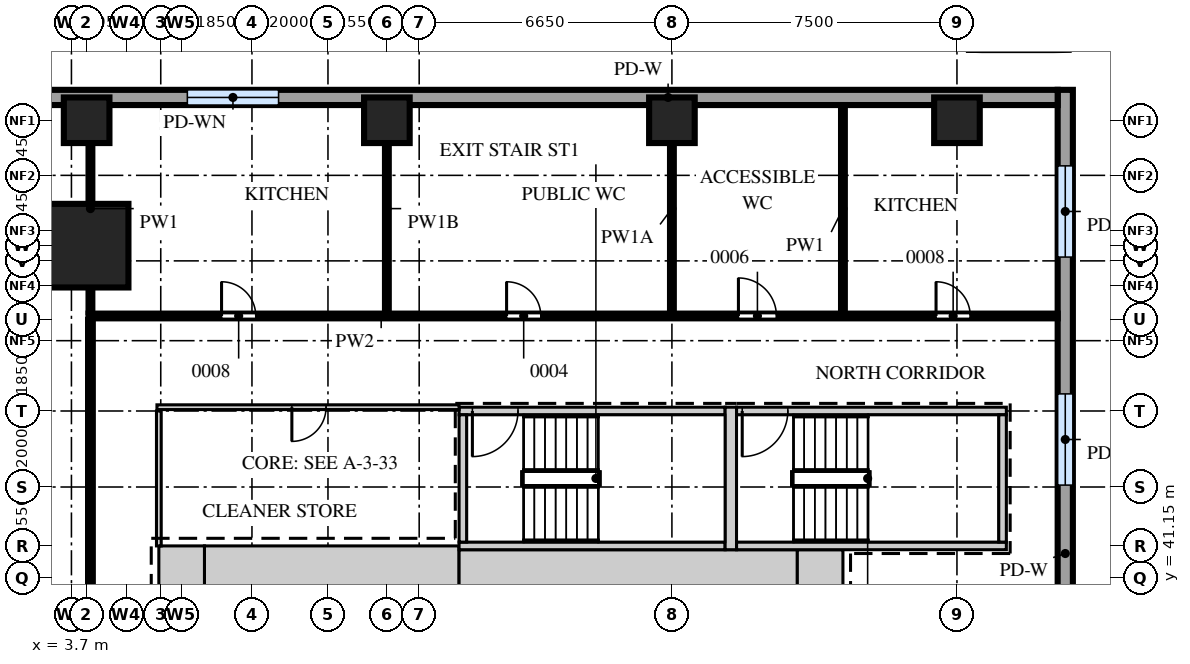
"""IFC4 building model, lengths in metres.
Left out: names, types, materials, properties, quantities, classifications, styles, units other than length and angle.
Written with IfcOpenShell. Run it as: python <this file> out.ifc"""

import sys

from ifc_helpers import new_model, si_unit, direction, frame, frame_2d, origin, origin_2d, place, context, subcontext, project, spatial, rectangle, extrude, source, transform, mapped, element, fill, save


model = new_model("IFC4")
c1 = context("Model", 3, precision=1e-05, world=origin(), true_north=direction((0.0, 1.0)))
c2 = subcontext(c1, "Body", "Model", "MODEL_VIEW")
j1 = project(units=[si_unit("LENGTHUNIT", "METRE"), si_unit("PLANEANGLEUNIT", "RADIAN")], contexts=[c1])
p1 = place(None, origin())
s1 = spatial("IfcSite", under=j1, at=p1, CompositionType="ELEMENT")
p2 = place(p1, origin())
s2 = spatial("IfcBuilding", under=s1, at=p2, CompositionType="ELEMENT")
p3 = place(p2, frame((0.0, 0.0, 13.0)))
s3 = spatial("IfcBuildingStorey", under=s2, at=p3, CompositionType="ELEMENT", Elevation=13.0)
m1 = source(origin(), c2, "Body", "SweptSolid", [
    extrude(rectangle(XDim=6.7, YDim=1.2, at=frame_2d((3.35, 0.0))), origin(), (0.0, 0.0, 1.0), 5.2),
])
p4 = place(p3, frame((7.2, 41.4, 0.0), z_axis=(0.0, 0.0, 1.0), x_axis=(1.0, 0.0, 0.0)))
e1 = element("IfcWall", 1, at=p4, inside=s3, PredefinedType="SHEAR", context=c2, shape_type="MappedRepresentation", body=[
    mapped(m1, transform((0.0, 0.0, 0.0))),
])
m2 = source(origin(), c2, "Body", "SweptSolid", [
    extrude(rectangle(XDim=8.9, YDim=1.1, at=frame_2d((4.45, 0.0))), origin(), (0.0, 0.0, 1.0), 5.2),
])
p5 = place(p3, frame((13.9, 41.35, 0.0), z_axis=(0.0, 0.0, 1.0), x_axis=(1.0, 0.0, 0.0)))
e2 = element("IfcWall", 2, at=p5, inside=s3, PredefinedType="SHEAR", context=c2, shape_type="MappedRepresentation", body=[
    mapped(m2, transform((0.0, 0.0, 0.0))),
])
m3 = source(origin(), c2, "Body", "SweptSolid", [
    extrude(rectangle(XDim=1.2, YDim=1.1, at=frame_2d((0.6, 0.0))), origin(), (0.0, 0.0, 1.0), 5.2),
])
p6 = place(p3, frame((22.8, 41.35, 0.0), z_axis=(0.0, 0.0, 1.0), x_axis=(1.0, 0.0, 0.0)))
e3 = element("IfcWall", 3, at=p6, inside=s3, PredefinedType="SHEAR", context=c2, shape_type="MappedRepresentation", body=[
    mapped(m3, transform((0.0, 0.0, 0.0))),
])
m4 = source(origin(), c2, "Body", "SweptSolid", [
    extrude(rectangle(XDim=1.2, YDim=1.2, at=frame_2d((0.6, 0.0))), origin(), (0.0, 0.0, 1.0), 5.2),
])
p7 = place(p3, frame((6.0, 41.4, 0.0), z_axis=(0.0, 0.0, 1.0), x_axis=(1.0, 0.0, 0.0)))
e4 = element("IfcWall", 4, at=p7, inside=s3, PredefinedType="SHEAR", context=c2, shape_type="MappedRepresentation", body=[
    mapped(m4, transform((0.0, 0.0, 0.0))),
])
m5 = source(origin(), c2, "Body", "SweptSolid", [
    extrude(rectangle(XDim=7.0, YDim=0.2, at=frame_2d((3.5, 0.0))), origin(), (0.0, 0.0, 1.0), 5.2),
])
p8 = place(p3, frame((13.9, 45.55, 0.0), z_axis=(0.0, 0.0, 1.0), x_axis=(1.0, 0.0, 0.0)))
e5 = element("IfcWall", 5, at=p8, inside=s3, PredefinedType="SHEAR", context=c2, shape_type="MappedRepresentation", body=[
    mapped(m5, transform((0.0, 0.0, 0.0))),
])
m6 = source(origin(), c2, "Body", "SweptSolid", [
    extrude(rectangle(XDim=1.2, YDim=2.1, at=frame_2d((0.6, 1.05))), frame((0.0, 0.11, 0.0), z_axis=(0.0, -1.0, 0.0), x_axis=(1.0, 0.0, 0.0)), (0.0, 0.0, 1.0), 0.22),
])
p9 = place(p8, frame((0.35, 0.0, 0.0)))
e6 = element("IfcOpeningElement", 6, at=p9, cuts=e5, PredefinedType="OPENING", context=c2, shape_type="MappedRepresentation", body=[
    mapped(m6, transform((0.0, 0.0, 0.0))),
])
p10 = place(p3, frame((13.9, 42.0, 0.0), z_axis=(0.0, 0.0, 1.0), x_axis=(1.0, 0.0, 0.0)))
e7 = element("IfcWall", 7, at=p10, inside=s3, PredefinedType="SHEAR", context=c2, shape_type="MappedRepresentation", body=[
    mapped(m5, transform((0.0, 0.0, 0.0))),
])
m7 = source(origin(), c2, "Body", "SweptSolid", [
    extrude(rectangle(XDim=7.1, YDim=0.2, at=frame_2d((3.55, 0.0))), origin(), (0.0, 0.0, 1.0), 5.2),
])
p11 = place(p3, frame((21.2, 45.55, 0.0), z_axis=(0.0, 0.0, 1.0), x_axis=(1.0, 0.0, 0.0)))
e8 = element("IfcWall", 8, at=p11, inside=s3, PredefinedType="SHEAR", context=c2, shape_type="MappedRepresentation", body=[
    mapped(m7, transform((0.0, 0.0, 0.0))),
])
p12 = place(p11, frame((0.15, 0.0, 0.0)))
e9 = element("IfcOpeningElement", 9, at=p12, cuts=e8, PredefinedType="OPENING", context=c2, shape_type="MappedRepresentation", body=[
    mapped(m6, transform((0.0, 0.0, 0.0))),
])
p13 = place(p3, frame((21.2, 42.0, 0.0), z_axis=(0.0, 0.0, 1.0), x_axis=(1.0, 0.0, 0.0)))
e10 = element("IfcWall", 10, at=p13, inside=s3, PredefinedType="SHEAR", context=c2, shape_type="MappedRepresentation", body=[
    mapped(m7, transform((0.0, 0.0, 0.0))),
])
m8 = source(origin(), c2, "Body", "SweptSolid", [
    extrude(rectangle(XDim=3.75, YDim=0.3, at=frame_2d((1.875, 0.0))), origin(), (0.0, 0.0, 1.0), 5.2),
])
p14 = place(p3, frame((21.05, 41.9, 0.0), z_axis=(0.0, 0.0, 1.0), x_axis=(0.0, 1.0, 0.0)))
e11 = element("IfcWall", 11, at=p14, inside=s3, PredefinedType="SHEAR", context=c2, shape_type="MappedRepresentation", body=[
    mapped(m8, transform((0.0, 0.0, 0.0))),
])
m9 = source(origin(), c2, "Body", "SweptSolid", [
    extrude(rectangle(XDim=3.35, YDim=0.2, at=frame_2d((1.675, 0.0))), origin(), (0.0, 0.0, 1.0), 5.2),
])
for number, where, z_axis, x_axis in (
    (12, (14.0, 42.1, 0.0), (0.0, 0.0, 1.0), (0.0, 1.0, 0.0)),
    (13, (28.2, 42.1, 0.0), (0.0, 0.0, 1.0), (0.0, 1.0, 0.0)),
):
    element("IfcWall", number, at=place(p3, frame(where, z_axis=z_axis, x_axis=x_axis)), inside=s3, PredefinedType="SHEAR", context=c2, shape_type="MappedRepresentation", body=[
        mapped(m9, transform((0.0, 0.0, 0.0))),
    ])
m10 = source(origin(), c2, "Body", "SweptSolid", [
    extrude(rectangle(XDim=2.2, YDim=2.2, at=origin_2d()), origin(), (0.0, 0.0, 1.0), 5.2),
])
p15 = place(p3, frame((4.1, 49.9, 0.0), z_axis=(0.0, 0.0, 1.0), x_axis=(1.0, 0.0, 0.0)))
e14 = element("IfcColumn", 14, at=p15, inside=s3, PredefinedType="COLUMN", context=c2, shape_type="MappedRepresentation", body=[
    mapped(m10, transform((0.0, 0.0, 0.0))),
])
m11 = source(origin(), c2, "Body", "SweptSolid", [
    extrude(rectangle(XDim=1.2, YDim=1.2, at=origin_2d()), origin(), (0.0, 0.0, 1.0), 5.2),
])
for number, where, z_axis, x_axis in (
    (15, (4.1, 53.2, 0.0), (0.0, 0.0, 1.0), (1.0, 0.0, 0.0)),
    (16, (12.0, 53.2, 0.0), (0.0, 0.0, 1.0), (1.0, 0.0, 0.0)),
    (17, (19.5, 53.2, 0.0), (0.0, 0.0, 1.0), (1.0, 0.0, 0.0)),
    (18, (27.0, 53.2, 0.0), (0.0, 0.0, 1.0), (1.0, 0.0, 0.0)),
):
    element("IfcColumn", number, at=place(p3, frame(where, z_axis=z_axis, x_axis=x_axis)), inside=s3, PredefinedType="COLUMN", context=c2, shape_type="MappedRepresentation", body=[
        mapped(m11, transform((0.0, 0.0, 0.0))),
    ])
m12 = source(origin(), c2, "Body", "SweptSolid", [
    extrude(rectangle(XDim=18.4, YDim=0.4, at=frame_2d((9.2, 0.0))), origin(), (0.0, 0.0, 1.0), 5.2),
])
p16 = place(p3, frame((29.85, 35.6, 0.0), z_axis=(0.0, 0.0, 1.0), x_axis=(0.0, 1.0, 0.0)))
e19 = element("IfcWall", 19, at=p16, inside=s3, PredefinedType="SOLIDWALL", context=c2, shape_type="MappedRepresentation", body=[
    mapped(m12, transform((0.0, 0.0, 0.0))),
])
m13 = source(origin(), c2, "Body", "SweptSolid", [
    extrude(rectangle(XDim=2.4, YDim=2.4, at=frame_2d((1.2, 1.2))), frame((0.0, 0.21, 0.0), z_axis=(0.0, -1.0, 0.0), x_axis=(1.0, 0.0, 0.0)), (0.0, 0.0, 1.0), 0.42),
])
p17 = place(p16, frame((2.0, 0.0, 1.0)))
e20 = element("IfcOpeningElement", 20, at=p17, cuts=e19, PredefinedType="OPENING", context=c2, shape_type="MappedRepresentation", body=[
    mapped(m13, transform((0.0, 0.0, 0.0))),
])
p18 = place(p16, frame((8.0, 0.0, 1.0)))
e21 = element("IfcOpeningElement", 21, at=p18, cuts=e19, PredefinedType="OPENING", context=c2, shape_type="MappedRepresentation", body=[
    mapped(m13, transform((0.0, 0.0, 0.0))),
])
p19 = place(p16, frame((14.0, 0.0, 1.0)))
e22 = element("IfcOpeningElement", 22, at=p19, cuts=e19, PredefinedType="OPENING", context=c2, shape_type="MappedRepresentation", body=[
    mapped(m13, transform((0.0, 0.0, 0.0))),
])
m14 = source(origin(), c2, "Body", "SweptSolid", [
    extrude(rectangle(XDim=31.44, YDim=0.4, at=frame_2d((15.72, 0.0))), origin(), (0.0, 0.0, 1.0), 5.2),
])
p20 = place(p3, frame((29.65, 53.8, 0.0), z_axis=(0.0, 0.0, 1.0), x_axis=(-1.0, 0.0, 0.0)))
e23 = element("IfcWall", 23, at=p20, inside=s3, PredefinedType="SOLIDWALL", context=c2, shape_type="MappedRepresentation", body=[
    mapped(m14, transform((0.0, 0.0, 0.0))),
])
p21 = place(p20, frame((20.5, 0.0, 1.0)))
e24 = element("IfcOpeningElement", 24, at=p21, cuts=e23, PredefinedType="OPENING", context=c2, shape_type="MappedRepresentation", body=[
    mapped(m13, transform((0.0, 0.0, 0.0))),
])
p22 = place(p20, frame((26.5, 0.0, 1.0)))
e25 = element("IfcOpeningElement", 25, at=p22, cuts=e23, PredefinedType="OPENING", context=c2, shape_type="MappedRepresentation", body=[
    mapped(m13, transform((0.0, 0.0, 0.0))),
])
m15 = source(origin(), c2, "Body", "SweptSolid", [
    extrude(rectangle(XDim=41.8, YDim=0.125, at=frame_2d((20.9, 0.0))), origin(), (0.0, 0.0, 1.0), 5.2),
])
p23 = place(p3, frame((4.2, 6.15, 0.0), z_axis=(0.0, 0.0, 1.0), x_axis=(0.0, 1.0, 0.0)))
e26 = element("IfcWall", 26, at=p23, inside=s3, PredefinedType="PARTITIONING", context=c2, shape_type="MappedRepresentation", body=[
    mapped(m15, transform((0.0, 0.0, 0.0))),
])
m16 = source(origin(), c2, "Body", "SweptSolid", [
    extrude(rectangle(XDim=1.2, YDim=2.1, at=frame_2d((0.6, 1.05))), frame((0.0, 0.073, 0.0), z_axis=(0.0, -1.0, 0.0), x_axis=(1.0, 0.0, 0.0)), (0.0, 0.0, 1.0), 0.145),
])
p24 = place(p23, frame((7.1, 0.0, 0.0)))
e27 = element("IfcOpeningElement", 27, at=p24, cuts=e26, PredefinedType="OPENING", context=c2, shape_type="MappedRepresentation", body=[
    mapped(m16, transform((0.0, 0.0, 0.0))),
])
p25 = place(p23, frame((25.85, 0.0, 0.0)))
e28 = element("IfcOpeningElement", 28, at=p25, cuts=e26, PredefinedType="OPENING", context=c2, shape_type="MappedRepresentation", body=[
    mapped(m16, transform((0.0, 0.0, 0.0))),
])
m17 = source(origin(), c2, "Body", "SweptSolid", [
    extrude(rectangle(XDim=3.55, YDim=0.125, at=frame_2d((1.775, 0.0))), origin(), (0.0, 0.0, 1.0), 5.2),
])
p26 = place(p3, frame((6.0, 42.0, 0.0), z_axis=(0.0, 0.0, 1.0), x_axis=(0.0, 1.0, 0.0)))
e29 = element("IfcWall", 29, at=p26, inside=s3, PredefinedType="PARTITIONING", context=c2, shape_type="MappedRepresentation", body=[
    mapped(m17, transform((0.0, 0.0, 0.0))),
])
m18 = source(origin(), c2, "Body", "SweptSolid", [
    extrude(rectangle(XDim=7.95, YDim=0.125, at=frame_2d((3.975, 0.0))), origin(), (0.0, 0.0, 1.0), 5.2),
])
p27 = place(p3, frame((5.95, 45.65, 0.0), z_axis=(0.0, 0.0, 1.0), x_axis=(1.0, 0.0, 0.0)))
e30 = element("IfcWall", 30, at=p27, inside=s3, PredefinedType="PARTITIONING", context=c2, shape_type="MappedRepresentation", body=[
    mapped(m18, transform((0.0, 0.0, 0.0))),
])
m19 = source(origin(), c2, "Body", "SweptSolid", [
    extrude(rectangle(XDim=0.9, YDim=2.1, at=frame_2d((0.45, 1.05))), frame((0.0, 0.073, 0.0), z_axis=(0.0, -1.0, 0.0), x_axis=(1.0, 0.0, 0.0)), (0.0, 0.0, 1.0), 0.145),
])
p28 = place(p27, frame((3.55, 0.0, 0.0)))
e31 = element("IfcOpeningElement", 31, at=p28, cuts=e30, PredefinedType="OPENING", context=c2, shape_type="MappedRepresentation", body=[
    mapped(m19, transform((0.0, 0.0, 0.0))),
])
m20 = source(origin(), c2, "Body", "SweptSolid", [
    extrude(rectangle(XDim=25.5, YDim=0.125, at=frame_2d((12.75, 0.0))), origin(), (0.0, 0.0, 1.0), 5.2),
])
p29 = place(p3, frame((4.15, 48.05, 0.0), z_axis=(0.0, 0.0, 1.0), x_axis=(1.0, 0.0, 0.0)))
e32 = element("IfcWall", 32, at=p29, inside=s3, PredefinedType="PARTITIONING", context=c2, shape_type="MappedRepresentation", body=[
    mapped(m20, transform((0.0, 0.0, 0.0))),
])
p30 = place(p29, frame((3.5, 0.0, 0.0)))
e33 = element("IfcOpeningElement", 33, at=p30, cuts=e32, PredefinedType="OPENING", context=c2, shape_type="MappedRepresentation", body=[
    mapped(m19, transform((0.0, 0.0, 0.0))),
])
p31 = place(p29, frame((11.0, 0.0, 0.0)))
e34 = element("IfcOpeningElement", 34, at=p31, cuts=e32, PredefinedType="OPENING", context=c2, shape_type="MappedRepresentation", body=[
    mapped(m19, transform((0.0, 0.0, 0.0))),
])
m21 = source(origin(), c2, "Body", "SweptSolid", [
    extrude(rectangle(XDim=1.0, YDim=2.1, at=frame_2d((0.5, 1.05))), frame((0.0, 0.073, 0.0), z_axis=(0.0, -1.0, 0.0), x_axis=(1.0, 0.0, 0.0)), (0.0, 0.0, 1.0), 0.145),
])
p32 = place(p29, frame((17.1, 0.0, 0.0)))
e35 = element("IfcOpeningElement", 35, at=p32, cuts=e32, PredefinedType="OPENING", context=c2, shape_type="MappedRepresentation", body=[
    mapped(m21, transform((0.0, 0.0, 0.0))),
])
p33 = place(p29, frame((22.3, 0.0, 0.0)))
e36 = element("IfcOpeningElement", 36, at=p33, cuts=e32, PredefinedType="OPENING", context=c2, shape_type="MappedRepresentation", body=[
    mapped(m19, transform((0.0, 0.0, 0.0))),
])
m22 = source(origin(), c2, "Body", "SweptSolid", [
    extrude(rectangle(XDim=5.45, YDim=0.1, at=frame_2d((2.725, 0.0))), origin(), (0.0, 0.0, 1.0), 5.2),
])
p34 = place(p3, frame((4.2, 48.15, 0.0), z_axis=(0.0, 0.0, 1.0), x_axis=(0.0, 1.0, 0.0)))
e37 = element("IfcWall", 37, at=p34, inside=s3, PredefinedType="PARTITIONING", context=c2, shape_type="MappedRepresentation", body=[
    mapped(m22, transform((0.0, 0.0, 0.0))),
])
m23 = source(origin(), c2, "Body", "SweptSolid", [
    extrude(rectangle(XDim=5.45, YDim=0.1, at=frame_2d((2.725, 0.0))), origin(), (0.0, 0.0, 1.0), 4.7),
])
p35 = place(p3, frame((12.0, 48.15, 0.0), z_axis=(0.0, 0.0, 1.0), x_axis=(0.0, 1.0, 0.0)))
e38 = element("IfcWall", 38, at=p35, inside=s3, PredefinedType="PARTITIONING", context=c2, shape_type="MappedRepresentation", body=[
    mapped(m23, transform((0.0, 0.0, 0.0))),
])
m24 = source(origin(), c2, "Body", "SweptSolid", [
    extrude(rectangle(XDim=5.45, YDim=0.1, at=frame_2d((2.725, 0.0))), origin(), (0.0, 0.0, 1.0), 4.84),
])
p36 = place(p3, frame((19.5, 48.15, 0.0), z_axis=(0.0, 0.0, 1.0), x_axis=(0.0, 1.0, 0.0)))
e39 = element("IfcWall", 39, at=p36, inside=s3, PredefinedType="PARTITIONING", context=c2, shape_type="MappedRepresentation", body=[
    mapped(m24, transform((0.0, 0.0, 0.0))),
])
p37 = place(p3, frame((24.0, 48.15, 0.0), z_axis=(0.0, 0.0, 1.0), x_axis=(0.0, 1.0, 0.0)))
e40 = element("IfcWall", 40, at=p37, inside=s3, PredefinedType="PARTITIONING", context=c2, shape_type="MappedRepresentation", body=[
    mapped(m22, transform((0.0, 0.0, 0.0))),
])
m25 = source(origin(), c2, "Body", "SweptSolid", [
    extrude(rectangle(XDim=2.4, YDim=2.4, at=frame_2d((1.2, 1.2))), frame((0.0, 0.03, 0.0), z_axis=(0.0, -1.0, 0.0), x_axis=(1.0, 0.0, 0.0)), (0.0, 0.0, 1.0), 0.06),
])
p38 = place(p18, origin())
e41 = element("IfcWindow", 41, at=p38, inside=s3, PartitioningType="SINGLE_PANEL", PredefinedType="WINDOW", context=c2, shape_type="MappedRepresentation", body=[
    mapped(m25, transform((0.0, 0.0, 0.0))),
])
fill(e21, e41)
p39 = place(p19, origin())
e42 = element("IfcWindow", 42, at=p39, inside=s3, PartitioningType="SINGLE_PANEL", PredefinedType="WINDOW", context=c2, shape_type="MappedRepresentation", body=[
    mapped(m25, transform((0.0, 0.0, 0.0))),
])
fill(e22, e42)
p40 = place(p21, origin())
e43 = element("IfcWindow", 43, at=p40, inside=s3, PartitioningType="SINGLE_PANEL", PredefinedType="WINDOW", context=c2, shape_type="MappedRepresentation", body=[
    mapped(m25, transform((0.0, 0.0, 0.0))),
])
fill(e24, e43)
m26 = source(origin(), c2, "Body", "SweptSolid", [
    extrude(rectangle(XDim=0.9, YDim=2.1, at=frame_2d((0.45, 1.05))), frame((0.0, 0.025, 0.0), z_axis=(0.0, -1.0, 0.0), x_axis=(1.0, 0.0, 0.0)), (0.0, 0.0, 1.0), 0.05),
])
p41 = place(p30, origin())
e44 = element("IfcDoor", 44, at=p41, inside=s3, OperationType="SINGLE_SWING_RIGHT", PredefinedType="DOOR", context=c2, shape_type="MappedRepresentation", body=[
    mapped(m26, transform((0.0, 0.0, 0.0))),
])
fill(e33, e44)
p42 = place(p31, origin())
e45 = element("IfcDoor", 45, at=p42, inside=s3, OperationType="SINGLE_SWING_RIGHT", PredefinedType="DOOR", context=c2, shape_type="MappedRepresentation", body=[
    mapped(m26, transform((0.0, 0.0, 0.0))),
])
fill(e34, e45)
m27 = source(origin(), c2, "Body", "SweptSolid", [
    extrude(rectangle(XDim=1.0, YDim=2.1, at=frame_2d((0.5, 1.05))), frame((0.0, 0.025, 0.0), z_axis=(0.0, -1.0, 0.0), x_axis=(1.0, 0.0, 0.0)), (0.0, 0.0, 1.0), 0.05),
])
p43 = place(p32, origin())
e46 = element("IfcDoor", 46, at=p43, inside=s3, OperationType="SINGLE_SWING_RIGHT", PredefinedType="DOOR", context=c2, shape_type="MappedRepresentation", body=[
    mapped(m27, transform((0.0, 0.0, 0.0))),
])
fill(e35, e46)
p44 = place(p33, origin())
e47 = element("IfcDoor", 47, at=p44, inside=s3, OperationType="SINGLE_SWING_RIGHT", PredefinedType="DOOR", context=c2, shape_type="MappedRepresentation", body=[
    mapped(m26, transform((0.0, 0.0, 0.0))),
])
fill(e36, e47)
p45 = place(p28, origin())
e48 = element("IfcDoor", 48, at=p45, inside=s3, OperationType="SINGLE_SWING_LEFT", PredefinedType="DOOR", context=c2, shape_type="MappedRepresentation", body=[
    mapped(m26, transform((0.0, 0.0, 0.0))),
])
fill(e31, e48)
m28 = source(origin(), c2, "Body", "SweptSolid", [
    extrude(rectangle(XDim=1.2, YDim=2.1, at=frame_2d((0.6, 1.05))), frame((0.0, 0.025, 0.0), z_axis=(0.0, -1.0, 0.0), x_axis=(1.0, 0.0, 0.0)), (0.0, 0.0, 1.0), 0.05),
])
p46 = place(p9, origin())
e49 = element("IfcDoor", 49, at=p46, inside=s3, OperationType="SINGLE_SWING_LEFT", PredefinedType="DOOR", context=c2, shape_type="MappedRepresentation", body=[
    mapped(m28, transform((0.0, 0.0, 0.0))),
])
fill(e6, e49)
p47 = place(p12, origin())
e50 = element("IfcDoor", 50, at=p47, inside=s3, OperationType="SINGLE_SWING_LEFT", PredefinedType="DOOR", context=c2, shape_type="MappedRepresentation", body=[
    mapped(m28, transform((0.0, 0.0, 0.0))),
])
fill(e9, e50)
save(model, sys.argv[1])
